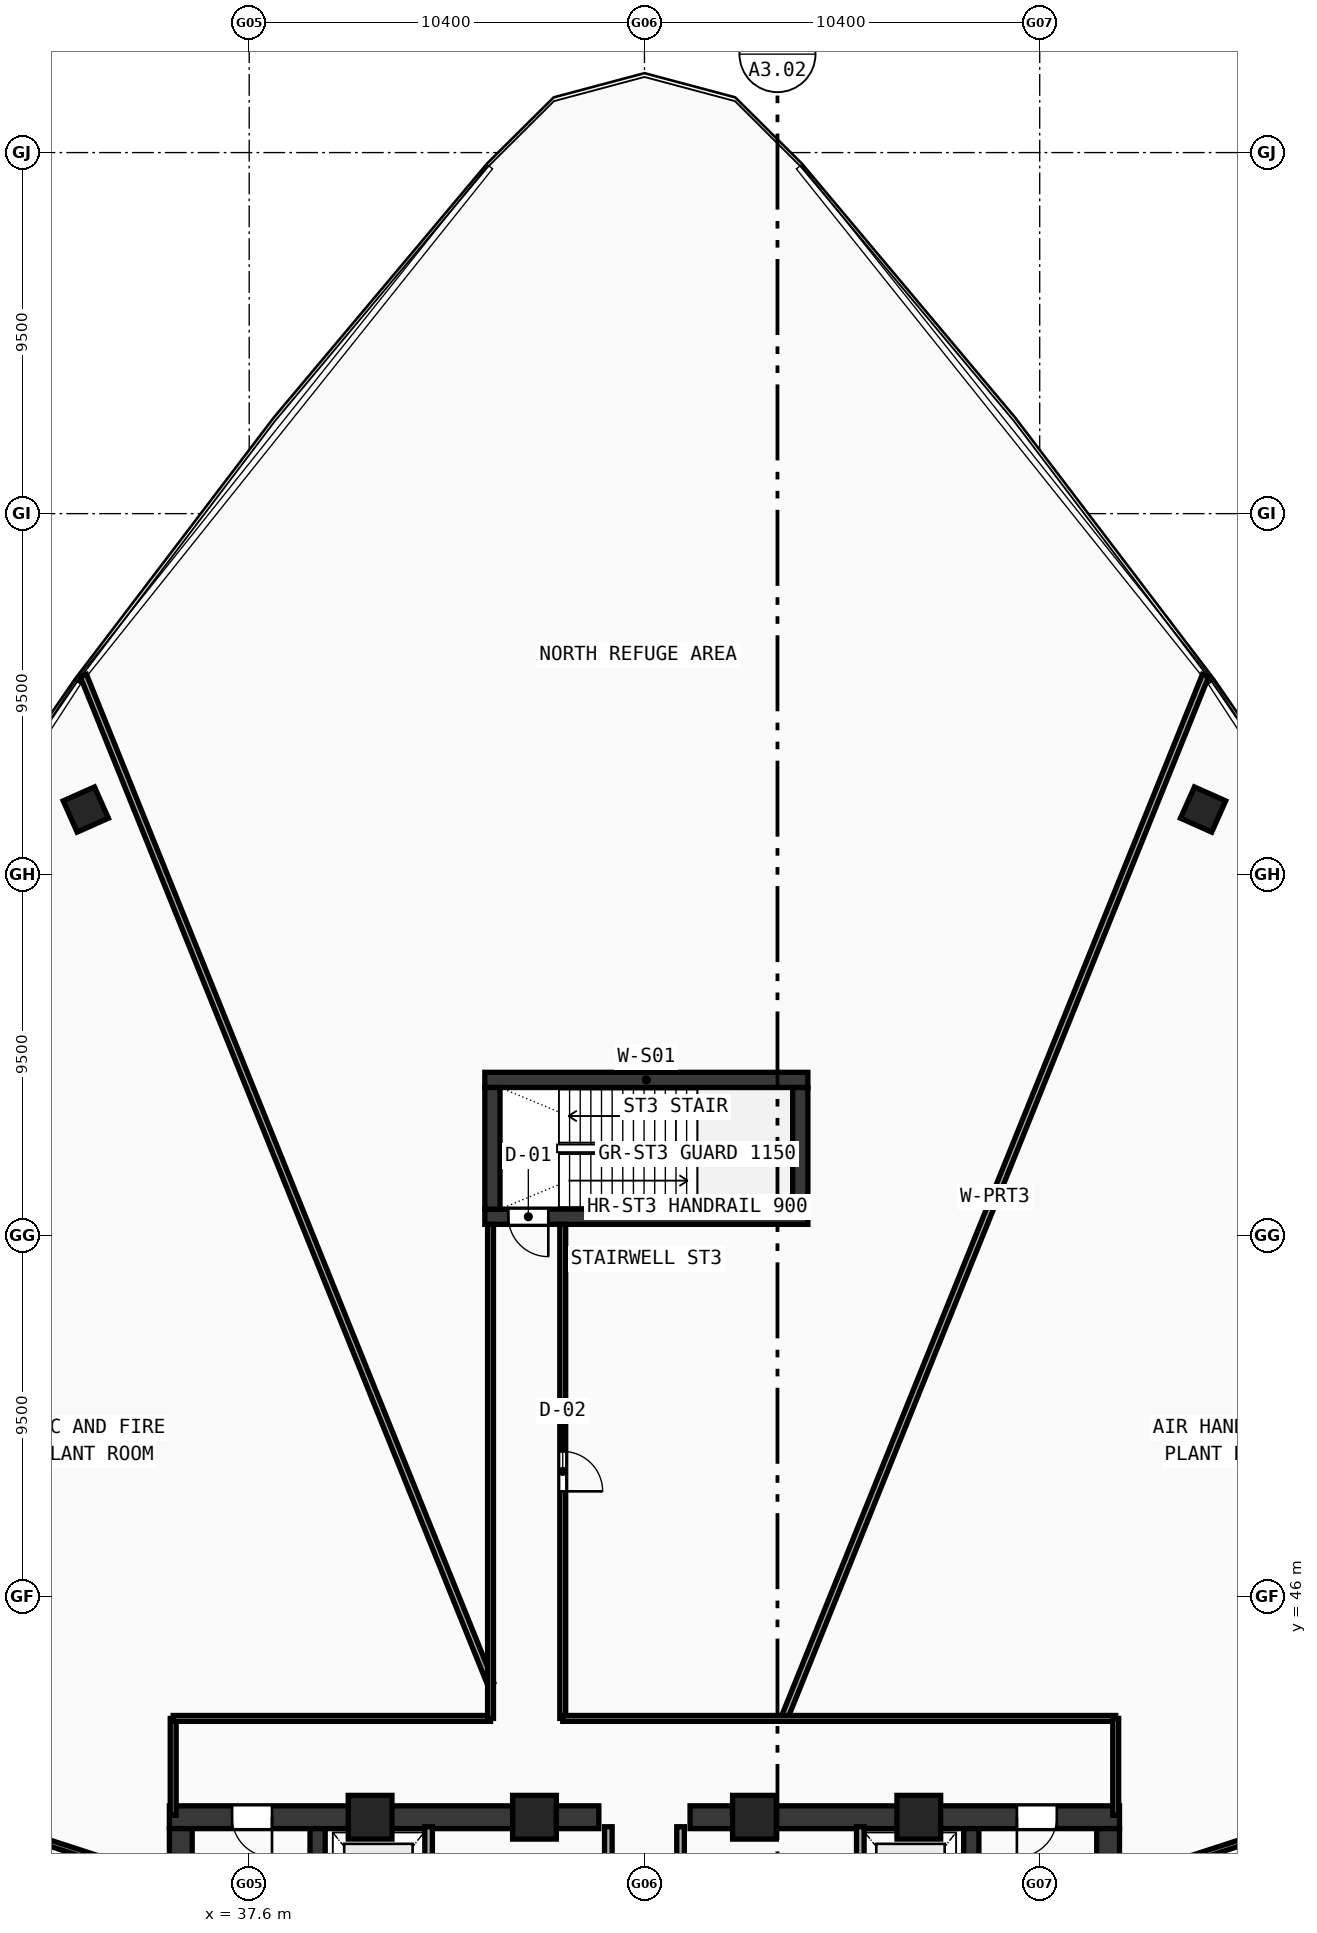
"""IFC4 building model, lengths in metres.
Left out: names, types, materials, properties, quantities, classifications, styles, units other than length and angle.
Written with IfcOpenShell. Run it as: python <this file> out.ifc"""

import sys

from ifc_helpers import new_model, si_unit, direction, frame, frame_2d, origin, origin_with_axes, origin_2d, place, context, subcontext, project, spatial, rectangle, hollow_rectangle, extrude, source, transform, mapped, element, fill, save


model = new_model("IFC4")
c1 = context("Model", 3, precision=1e-05, world=origin(), true_north=direction((0.0, 1.0)))
c2 = subcontext(c1, "Body", "Model", "MODEL_VIEW")
j1 = project(units=[si_unit("LENGTHUNIT", "METRE"), si_unit("PLANEANGLEUNIT", "RADIAN")], contexts=[c1])
p1 = place(None, origin())
s1 = spatial("IfcSite", under=j1, at=p1, CompositionType="ELEMENT")
p2 = place(p1, origin())
s2 = spatial("IfcBuilding", under=s1, at=p2, CompositionType="ELEMENT")
p3 = place(p2, frame((0.0, 0.0, 176.16)))
s3 = spatial("IfcBuildingStorey", under=s2, at=p3, CompositionType="ELEMENT", Elevation=176.16)
p4 = place(p3, frame((35.5, 40.2, 0.0), z_axis=(0.0, 0.0, 1.0), x_axis=(1.0, 0.0, 0.0)))
e1 = element("IfcWall", 1, at=p4, inside=s3, PredefinedType="SHEAR", context=c2, shape_type="SweptSolid", body=[
    extrude(rectangle(XDim=11.3, YDim=0.6, at=frame_2d((5.65, 0.0))), origin(), (0.0, 0.0, 1.0), 4.54),
])
p5 = place(p4, frame((1.65, 0.0, 0.0)))
e2 = element("IfcOpeningElement", 2, at=p5, cuts=e1, PredefinedType="OPENING", context=c2, shape_type="SweptSolid", body=[
    extrude(rectangle(XDim=1.05, YDim=2.1, at=frame_2d((0.525, 1.05))), frame((0.0, 0.31, 0.0), z_axis=(0.0, -1.0, 0.0), x_axis=(1.0, 0.0, 0.0)), (0.0, 0.0, 1.0), 0.62),
])
p6 = place(p3, frame((49.2, 40.2, 0.0), z_axis=(0.0, 0.0, 1.0), x_axis=(1.0, 0.0, 0.0)))
e3 = element("IfcWall", 3, at=p6, inside=s3, PredefinedType="SHEAR", context=c2, shape_type="SweptSolid", body=[
    extrude(rectangle(XDim=11.3, YDim=0.6, at=frame_2d((5.65, 0.0))), origin(), (0.0, 0.0, 1.0), 4.54),
])
p7 = place(p6, frame((8.6, 0.0, 0.0)))
e4 = element("IfcOpeningElement", 4, at=p7, cuts=e3, PredefinedType="OPENING", context=c2, shape_type="SweptSolid", body=[
    extrude(rectangle(XDim=1.05, YDim=2.1, at=frame_2d((0.525, 1.05))), frame((0.0, 0.31, 0.0), z_axis=(0.0, -1.0, 0.0), x_axis=(1.0, 0.0, 0.0)), (0.0, 0.0, 1.0), 0.62),
])
for number, where, z_axis, x_axis in (
    (5, (35.8, 27.8, 0.0), (0.0, 0.0, 1.0), (0.0, 1.0, 0.0)),
    (6, (60.2, 27.8, 0.0), (0.0, 0.0, 1.0), (0.0, 1.0, 0.0)),
):
    element("IfcWall", number, at=place(p3, frame(where, z_axis=z_axis, x_axis=x_axis)), inside=s3, PredefinedType="SHEAR", context=c2, shape_type="SweptSolid", body=[
        extrude(rectangle(XDim=12.1, YDim=0.6, at=frame_2d((6.05, 0.0))), origin(), (0.0, 0.0, 1.0), 4.54),
    ])
p8 = place(p3, frame((39.4, 27.8, 0.0), z_axis=(0.0, 0.0, 1.0), x_axis=(0.0, 1.0, 0.0)))
e7 = element("IfcWall", 7, at=p8, inside=s3, PredefinedType="SHEAR", context=c2, shape_type="SweptSolid", body=[
    extrude(rectangle(XDim=12.1, YDim=0.4, at=frame_2d((6.05, 0.0))), origin(), (0.0, 0.0, 1.0), 4.54),
])
p9 = place(p8, frame((9.95, 0.0, 0.0)))
e8 = element("IfcOpeningElement", 8, at=p9, cuts=e7, PredefinedType="OPENING", context=c2, shape_type="SweptSolid", body=[
    extrude(rectangle(XDim=1.1, YDim=2.1, at=frame_2d((0.55, 1.05))), frame((0.0, 0.21, 0.0), z_axis=(0.0, -1.0, 0.0), x_axis=(1.0, 0.0, 0.0)), (0.0, 0.0, 1.0), 0.42),
])
p10 = place(p3, frame((56.6, 27.8, 0.0), z_axis=(0.0, 0.0, 1.0), x_axis=(0.0, 1.0, 0.0)))
e9 = element("IfcWall", 9, at=p10, inside=s3, PredefinedType="SHEAR", context=c2, shape_type="SweptSolid", body=[
    extrude(rectangle(XDim=12.1, YDim=0.4, at=frame_2d((6.05, 0.0))), origin(), (0.0, 0.0, 1.0), 4.54),
])
p11 = place(p10, frame((9.95, 0.0, 0.0)))
e10 = element("IfcOpeningElement", 10, at=p11, cuts=e9, PredefinedType="OPENING", context=c2, shape_type="SweptSolid", body=[
    extrude(rectangle(XDim=1.1, YDim=2.1, at=frame_2d((0.55, 1.05))), frame((0.0, 0.21, 0.0), z_axis=(0.0, -1.0, 0.0), x_axis=(1.0, 0.0, 0.0)), (0.0, 0.0, 1.0), 0.42),
])
p12 = place(p3, frame((43.8, 59.6, 0.0), z_axis=(0.0, 0.0, 1.0), x_axis=(1.0, 0.0, 0.0)))
e11 = element("IfcWall", 11, at=p12, inside=s3, PredefinedType="SHEAR", context=c2, shape_type="SweptSolid", body=[
    extrude(rectangle(XDim=8.5, YDim=0.4, at=frame_2d((4.25, 0.0))), origin(), (0.0, 0.0, 1.0), 4.54),
])
p13 = place(p3, frame((43.8, 56.0, 0.0), z_axis=(0.0, 0.0, 1.0), x_axis=(1.0, 0.0, 0.0)))
e12 = element("IfcWall", 12, at=p13, inside=s3, PredefinedType="SHEAR", context=c2, shape_type="SweptSolid", body=[
    extrude(rectangle(XDim=8.5, YDim=0.4, at=frame_2d((4.25, 0.0))), origin(), (0.0, 0.0, 1.0), 4.54),
])
p14 = place(p13, frame((0.62, 0.0, 0.0)))
e13 = element("IfcOpeningElement", 13, at=p14, cuts=e12, PredefinedType="OPENING", context=c2, shape_type="SweptSolid", body=[
    extrude(rectangle(XDim=1.05, YDim=2.1, at=frame_2d((0.525, 1.05))), frame((0.0, 0.21, 0.0), z_axis=(0.0, -1.0, 0.0), x_axis=(1.0, 0.0, 0.0)), (0.0, 0.0, 1.0), 0.42),
])
for number, where, z_axis, x_axis in (
    (14, (44.0, 56.2, 0.0), (0.0, 0.0, 1.0), (0.0, 1.0, 0.0)),
    (15, (52.1, 56.2, 0.0), (0.0, 0.0, 1.0), (0.0, 1.0, 0.0)),
):
    element("IfcWall", number, at=place(p3, frame(where, z_axis=z_axis, x_axis=x_axis)), inside=s3, PredefinedType="SHEAR", context=c2, shape_type="SweptSolid", body=[
        extrude(rectangle(XDim=3.2, YDim=0.4, at=frame_2d((1.6, 0.0))), origin(), (0.0, 0.0, 1.0), 4.54),
    ])
m1 = source(origin(), c2, "Body", "SweptSolid", [
    extrude(hollow_rectangle(XDim=1.15, YDim=1.15, WallThickness=0.048, at=origin_2d()), origin(), (0.0, 0.0, 1.0), 4.82),
])
for number, where, z_axis, x_axis in (
    (16, (55.219, 40.2, -0.28), (0.0, 0.0, 1.0), (1.0, 0.0, 0.0)),
    (17, (50.894, 40.2, -0.28), (0.0, 0.0, 1.0), (1.0, 0.0, 0.0)),
    (18, (45.106, 40.2, -0.28), (0.0, 0.0, 1.0), (1.0, 0.0, 0.0)),
    (19, (40.781, 40.2, -0.28), (0.0, 0.0, 1.0), (1.0, 0.0, 0.0)),
):
    element("IfcColumn", number, at=place(p3, frame(where, z_axis=z_axis, x_axis=x_axis)), inside=s3, PredefinedType="COLUMN", context=c2, shape_type="MappedRepresentation", body=[
        mapped(m1, transform((0.0, 0.0, 0.0), scale=1.0)),
    ])
m2 = source(origin(), c2, "Body", "SweptSolid", [
    extrude(hollow_rectangle(XDim=0.9, YDim=0.9, WallThickness=0.036, at=origin_2d()), origin(), (0.0, 0.0, 1.0), 4.82),
])
for number, where, z_axis, x_axis in (
    (20, (62.699, 66.715, -0.28), (0.0, 0.0, 1.0), (-0.914, 0.407, 0.0)),
    (21, (33.301, 66.715, -0.28), (0.0, 0.0, 1.0), (-0.914, -0.407, 0.0)),
):
    element("IfcColumn", number, at=place(p3, frame(where, z_axis=z_axis, x_axis=x_axis)), inside=s3, PredefinedType="COLUMN", context=c2, shape_type="MappedRepresentation", body=[
        mapped(m2, transform((0.0, 0.0, 0.0), scale=1.0)),
    ])
p15 = place(p3, frame((42.32, 33.5, 0.0), z_axis=(0.0, 0.0, 1.0), x_axis=(0.0, 1.0, 0.0)))
e22 = element("IfcWall", 22, at=p15, inside=s3, PredefinedType="SOLIDWALL", context=c2, shape_type="SweptSolid", body=[
    extrude(rectangle(XDim=6.45, YDim=0.2, at=frame_2d((3.225, 0.0))), origin(), (0.0, 0.0, 1.0), 4.54),
])
p16 = place(p15, frame((1.0, 0.0, 0.0)))
e23 = element("IfcOpeningElement", 23, at=p16, cuts=e22, PredefinedType="OPENING", context=c2, shape_type="SweptSolid", body=[
    extrude(rectangle(XDim=1.05, YDim=2.1, at=frame_2d((0.525, 1.05))), frame((0.0, 0.11, 0.0), z_axis=(0.0, -1.0, 0.0), x_axis=(1.0, 0.0, 0.0)), (0.0, 0.0, 1.0), 0.22),
])
p17 = place(p3, frame((53.68, 36.65, 0.0), z_axis=(0.0, 0.0, 1.0), x_axis=(0.0, 1.0, 0.0)))
e24 = element("IfcWall", 24, at=p17, inside=s3, PredefinedType="SOLIDWALL", context=c2, shape_type="SweptSolid", body=[
    extrude(rectangle(XDim=3.3, YDim=0.2, at=frame_2d((1.65, 0.0))), origin(), (0.0, 0.0, 1.0), 4.54),
])
for number, where, z_axis, x_axis in (
    (25, (47.05, 37.32, 0.0), (0.0, 0.0, 1.0), (0.0, 1.0, 0.0)),
    (26, (48.95, 37.32, 0.0), (0.0, 0.0, 1.0), (0.0, 1.0, 0.0)),
):
    element("IfcWall", number, at=place(p3, frame(where, z_axis=z_axis, x_axis=x_axis)), inside=s3, PredefinedType="SOLIDWALL", context=c2, shape_type="SweptSolid", body=[
        extrude(rectangle(XDim=2.63, YDim=0.2, at=frame_2d((1.315, 0.0))), origin(), (0.0, 0.0, 1.0), 4.54),
    ])
p18 = place(p3, frame((60.616, 37.063, 0.0), z_axis=(0.0, 0.0, 1.0), x_axis=(0.951056691926, 0.309016453838, 0.0)))
e27 = element("IfcWall", 27, at=p18, inside=s3, PredefinedType="PARTITIONING", context=c2, shape_type="SweptSolid", body=[
    extrude(rectangle(XDim=19.19, YDim=0.155, at=frame_2d((9.595, 0.0))), origin(), (0.0, 0.0, 1.0), 3.89),
])
for number, where, z_axis, x_axis in (
    (28, (60.184, 38.395, 0.0), (0.0, 0.0, 1.0), (0.951, 0.309, 0.0)),
    (29, (35.816, 38.395, 0.0), (0.0, 0.0, 1.0), (-0.951, 0.309, 0.0)),
):
    element("IfcWall", number, at=place(p3, frame(where, z_axis=z_axis, x_axis=x_axis)), inside=s3, PredefinedType="PARTITIONING", context=c2, shape_type="SweptSolid", body=[
        extrude(rectangle(XDim=18.956, YDim=0.155, at=frame_2d((9.478, 0.0))), origin(), (0.0, 0.0, 1.0), 3.89),
    ])
p19 = place(p3, frame((35.384, 37.063, 0.0), z_axis=(0.0, 0.0, 1.0), x_axis=(-0.951056691926, 0.309016453838, 0.0)))
e30 = element("IfcWall", 30, at=p19, inside=s3, PredefinedType="PARTITIONING", context=c2, shape_type="SweptSolid", body=[
    extrude(rectangle(XDim=19.19, YDim=0.155, at=frame_2d((9.595, 0.0))), origin(), (0.0, 0.0, 1.0), 3.89),
])
p20 = place(p3, frame((51.677, 42.8, 0.0), z_axis=(0.0, 0.0, 1.0), x_axis=(0.374608867695, 0.927182935695, 0.0)))
e31 = element("IfcWall", 31, at=p20, inside=s3, PredefinedType="PARTITIONING", context=c2, shape_type="SweptSolid", body=[
    extrude(rectangle(XDim=29.592, YDim=0.175, at=frame_2d((14.796, 0.0))), origin(), (0.0, 0.0, 1.0), 3.89),
])
p21 = place(p3, frame((43.95, 43.724, 0.0), z_axis=(0.0, 0.0, 1.0), x_axis=(-0.374603363422, 0.927185159562, 0.0)))
e32 = element("IfcWall", 32, at=p21, inside=s3, PredefinedType="PARTITIONING", context=c2, shape_type="SweptSolid", body=[
    extrude(rectangle(XDim=28.595, YDim=0.175, at=frame_2d((14.298, 0.0))), origin(), (0.0, 0.0, 1.0), 3.89),
])
p22 = place(p3, frame((35.6, 40.25, 0.0), z_axis=(0.0, 0.0, 1.0), x_axis=(0.0, 1.0, 0.0)))
e33 = element("IfcWall", 33, at=p22, inside=s3, PredefinedType="PARTITIONING", context=c2, shape_type="SweptSolid", body=[
    extrude(rectangle(XDim=2.55, YDim=0.155, at=frame_2d((1.275, 0.0))), origin(), (0.0, 0.0, 1.0), 4.54),
])
p23 = place(p3, frame((35.6, 42.8, 0.0), z_axis=(0.0, 0.0, 1.0), x_axis=(1.0, 0.0, 0.0)))
e34 = element("IfcWall", 34, at=p23, inside=s3, PredefinedType="PARTITIONING", context=c2, shape_type="SweptSolid", body=[
    extrude(rectangle(XDim=8.35, YDim=0.155, at=frame_2d((4.175, 0.0))), origin(), (0.0, 0.0, 1.0), 3.89),
])
p24 = place(p3, frame((43.95, 42.8, 0.0), z_axis=(0.0, 0.0, 1.0), x_axis=(0.0, 1.0, 0.0)))
e35 = element("IfcWall", 35, at=p24, inside=s3, PredefinedType="PARTITIONING", context=c2, shape_type="SweptSolid", body=[
    extrude(rectangle(XDim=13.0, YDim=0.155, at=frame_2d((6.5, 0.0))), origin(), (0.0, 0.0, 1.0), 3.89),
])
p25 = place(p3, frame((45.85, 55.8, 0.0), z_axis=(0.0, 0.0, 1.0), x_axis=(0.0, -1.0, 0.0)))
e36 = element("IfcWall", 36, at=p25, inside=s3, PredefinedType="PARTITIONING", context=c2, shape_type="SweptSolid", body=[
    extrude(rectangle(XDim=13.0, YDim=0.155, at=frame_2d((6.5, 0.0))), origin(), (0.0, 0.0, 1.0), 4.14),
])
p26 = place(p25, frame((5.975, 0.0, 0.0)))
e37 = element("IfcOpeningElement", 37, at=p26, cuts=e36, PredefinedType="OPENING", context=c2, shape_type="SweptSolid", body=[
    extrude(rectangle(XDim=1.05, YDim=2.1, at=frame_2d((0.525, 1.05))), frame((0.0, 0.087, 0.0), z_axis=(0.0, -1.0, 0.0), x_axis=(1.0, 0.0, 0.0)), (0.0, 0.0, 1.0), 0.175),
])
p27 = place(p3, frame((45.85, 42.8, 0.0), z_axis=(0.0, 0.0, 1.0), x_axis=(1.0, 0.0, 0.0)))
e38 = element("IfcWall", 38, at=p27, inside=s3, PredefinedType="PARTITIONING", context=c2, shape_type="SweptSolid", body=[
    extrude(rectangle(XDim=14.55, YDim=0.155, at=frame_2d((7.275, 0.0))), origin(), (0.0, 0.0, 1.0), 3.89),
])
p28 = place(p3, frame((60.4, 42.8, 0.0), z_axis=(0.0, 0.0, 1.0), x_axis=(0.0, -1.0, 0.0)))
e39 = element("IfcWall", 39, at=p28, inside=s3, PredefinedType="PARTITIONING", context=c2, shape_type="SweptSolid", body=[
    extrude(rectangle(XDim=2.55, YDim=0.155, at=frame_2d((1.275, 0.0))), origin(), (0.0, 0.0, 1.0), 4.54),
])
m3 = source(origin(), c2, "Body", "SweptSolid", [
    extrude(rectangle(XDim=1.05, YDim=2.1, at=frame_2d((0.525, 1.05))), frame((0.0, 0.025, 0.0), z_axis=(0.0, -1.0, 0.0), x_axis=(1.0, 0.0, 0.0)), (0.0, 0.0, 1.0), 0.05),
])
p29 = place(p5, frame((1.05, 0.0, 0.0), z_axis=(0.0, 0.0, 1.0), x_axis=(-1.0, 0.0, 0.0)))
e40 = element("IfcDoor", 40, at=p29, inside=s3, OperationType="SINGLE_SWING_LEFT", PredefinedType="DOOR", context=c2, shape_type="MappedRepresentation", body=[
    mapped(m3, transform((0.0, 0.0, 0.0), scale=1.0)),
])
fill(e2, e40)
p30 = place(p7, frame((1.05, 0.0, 0.0), z_axis=(0.0, 0.0, 1.0), x_axis=(-1.0, 0.0, 0.0)))
e41 = element("IfcDoor", 41, at=p30, inside=s3, OperationType="SINGLE_SWING_RIGHT", PredefinedType="DOOR", context=c2, shape_type="MappedRepresentation", body=[
    mapped(m3, transform((0.0, 0.0, 0.0), scale=1.0)),
])
fill(e4, e41)
p31 = place(p14, frame((1.05, 0.0, 0.0), z_axis=(0.0, 0.0, 1.0), x_axis=(-1.0, 0.0, 0.0)))
e42 = element("IfcDoor", 42, at=p31, inside=s3, OperationType="SINGLE_SWING_LEFT", PredefinedType="DOOR", context=c2, shape_type="MappedRepresentation", body=[
    mapped(m3, transform((0.0, 0.0, 0.0), scale=1.0)),
])
fill(e13, e42)
p32 = place(p26, origin_with_axes())
e43 = element("IfcDoor", 43, at=p32, inside=s3, OperationType="SINGLE_SWING_RIGHT", PredefinedType="DOOR", context=c2, shape_type="MappedRepresentation", body=[
    mapped(m3, transform((0.0, 0.0, 0.0), scale=1.0)),
])
fill(e37, e43)
save(model, sys.argv[1])
